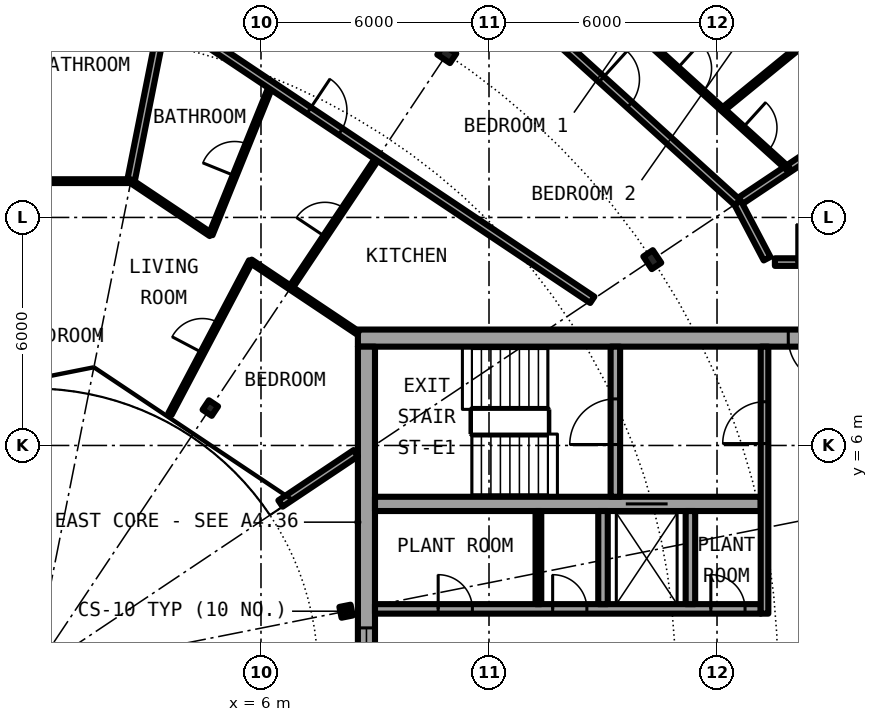
"""IFC4 building model, lengths in metres.
Left out: names, types, materials, properties, quantities, classifications, styles, units other than length and angle.
Written with IfcOpenShell. Run it as: python <this file> out.ifc"""

import sys

from ifc_helpers import new_model, si_unit, direction, frame, frame_2d, origin, origin_2d, place, context, subcontext, project, spatial, rectangle, i_section, extrude, element, fill, save


model = new_model("IFC4")
c1 = context("Model", 3, precision=1e-05, world=origin(), true_north=direction((0.0, 1.0)))
c2 = subcontext(c1, "Body", "Model", "MODEL_VIEW")
j1 = project(units=[si_unit("LENGTHUNIT", "METRE"), si_unit("PLANEANGLEUNIT", "RADIAN")], contexts=[c1])
p1 = place(None, origin())
s1 = spatial("IfcSite", under=j1, at=p1, CompositionType="ELEMENT")
p2 = place(p1, origin())
s2 = spatial("IfcBuilding", under=s1, at=p2, CompositionType="ELEMENT")
p3 = place(p2, frame((0.0, 0.0, 199.35)))
s3 = spatial("IfcBuildingStorey", under=s2, at=p3, CompositionType="ELEMENT", Elevation=199.35)
for number, where, z_axis, x_axis in (
    (1, (16.297, 10.889, 0.0), (0.0, 0.0, 1.0), (0.831, 0.556, 0.0)),
    (2, (10.889, 16.297, 0.0), (0.0, 0.0, 1.0), (0.556, 0.831, 0.0)),
):
    element("IfcColumn", number, at=place(p3, frame(where, z_axis=z_axis, x_axis=x_axis)), inside=s3, PredefinedType="COLUMN", context=c2, shape_type="SweptSolid", body=[
        extrude(i_section(OverallWidth=0.3, OverallDepth=0.4, WebThickness=0.013, FlangeThickness=0.024, FilletRadius=0.027, at=origin_2d()), origin(), (0.0, 0.0, 1.0), 3.05),
    ])
for number, where, z_axis, x_axis in (
    (3, (8.239, 1.639, 0.0), (0.0, 0.0, 1.0), (0.981, 0.195, 0.0)),
    (4, (4.667, 6.984, 0.0), (0.0, 0.0, 1.0), (0.556, 0.831, 0.0)),
):
    element("IfcColumn", number, at=place(p3, frame(where, z_axis=z_axis, x_axis=x_axis)), inside=s3, PredefinedType="COLUMN", context=c2, shape_type="SweptSolid", body=[
        extrude(i_section(OverallWidth=0.3, OverallDepth=0.29, WebThickness=0.009, FlangeThickness=0.014, FilletRadius=0.027, at=origin_2d()), origin(), (0.0, 0.0, 1.0), 3.05),
    ])
p4 = place(p3, frame((22.699, 15.167, 0.0), z_axis=(0.0, 0.0, 1.0), x_axis=(-0.634382322723, 0.773019449054, 0.0)))
e5 = element("IfcWall", 5, at=p4, inside=s3, PredefinedType="SOLIDWALL", context=c2, shape_type="SweptSolid", body=[
    extrude(rectangle(XDim=5.352, YDim=0.25, at=frame_2d((2.676, 0.0))), origin(), (0.0, 0.0, 1.0), 2.7),
])
p5 = place(p4, frame((0.441, 0.0, 0.3)))
e6 = element("IfcOpeningElement", 6, at=p5, cuts=e5, PredefinedType="OPENING", context=c2, shape_type="SweptSolid", body=[
    extrude(rectangle(XDim=1.8, YDim=2.1, at=frame_2d((0.9, 1.05))), frame((0.0, 0.135, 0.0), z_axis=(0.0, -1.0, 0.0), x_axis=(1.0, 0.0, 0.0)), (0.0, 0.0, 1.0), 0.27),
])
p6 = place(p4, frame((3.51, 0.0, 0.0)))
e7 = element("IfcOpeningElement", 7, at=p6, cuts=e5, PredefinedType="OPENING", context=c2, shape_type="SweptSolid", body=[
    extrude(rectangle(XDim=1.0, YDim=2.2, at=frame_2d((0.5, 1.1))), frame((0.0, 0.135, 0.0), z_axis=(0.0, -1.0, 0.0), x_axis=(1.0, 0.0, 0.0)), (0.0, 0.0, 1.0), 0.27),
])
p7 = place(p3, frame((22.05, 8.825, 0.0), z_axis=(0.0, 0.0, 1.0), x_axis=(-1.0, 0.0, 0.0)))
e8 = element("IfcWall", 8, at=p7, inside=s3, PredefinedType="SHEAR", context=c2, shape_type="SweptSolid", body=[
    extrude(rectangle(XDim=13.5, YDim=0.45, at=frame_2d((6.75, 0.0))), origin(), (0.0, 0.0, 1.0), 3.05),
])
p8 = place(p7, frame((0.975, 0.0, 0.0)))
e9 = element("IfcOpeningElement", 9, at=p8, cuts=e8, PredefinedType="OPENING", context=c2, shape_type="SweptSolid", body=[
    extrude(rectangle(XDim=1.2, YDim=2.3, at=frame_2d((0.6, 1.15))), frame((0.0, 0.235, 0.0), z_axis=(0.0, -1.0, 0.0), x_axis=(1.0, 0.0, 0.0)), (0.0, 0.0, 1.0), 0.47),
])
p9 = place(p3, frame((8.775, -8.6, 0.0), z_axis=(0.0, 0.0, 1.0), x_axis=(0.0, 1.0, 0.0)))
e10 = element("IfcWall", 10, at=p9, inside=s3, PredefinedType="SHEAR", context=c2, shape_type="SweptSolid", body=[
    extrude(rectangle(XDim=17.2, YDim=0.45, at=frame_2d((8.6, 0.0))), origin(), (0.0, 0.0, 1.0), 3.05),
])
p10 = place(p9, frame((7.4, 0.0, 0.1)))
e11 = element("IfcOpeningElement", 11, at=p10, cuts=e10, PredefinedType="OPENING", context=c2, shape_type="SweptSolid", body=[
    extrude(rectangle(XDim=2.4, YDim=2.2, at=frame_2d((1.2, 1.1))), frame((0.0, 0.235, 0.0), z_axis=(0.0, -1.0, 0.0), x_axis=(1.0, 0.0, 0.0)), (0.0, 0.0, 1.0), 0.47),
])
p11 = place(p3, frame((9.0, 1.7, 0.0), z_axis=(0.0, 0.0, 1.0), x_axis=(1.0, 0.0, 0.0)))
e12 = element("IfcWall", 12, at=p11, inside=s3, PredefinedType="SHEAR", context=c2, shape_type="SweptSolid", body=[
    extrude(rectangle(XDim=10.15, YDim=0.25, at=frame_2d((5.075, 0.0))), origin(), (0.0, 0.0, 1.0), 3.05),
])
p12 = place(p11, frame((1.663, 0.0, 0.0)))
e13 = element("IfcOpeningElement", 13, at=p12, cuts=e12, PredefinedType="OPENING", context=c2, shape_type="SweptSolid", body=[
    extrude(rectangle(XDim=0.9, YDim=2.3, at=frame_2d((0.45, 1.15))), frame((0.0, 0.135, 0.0), z_axis=(0.0, -1.0, 0.0), x_axis=(1.0, 0.0, 0.0)), (0.0, 0.0, 1.0), 0.27),
])
p13 = place(p11, frame((4.675, 0.0, 0.0)))
e14 = element("IfcOpeningElement", 14, at=p13, cuts=e12, PredefinedType="OPENING", context=c2, shape_type="SweptSolid", body=[
    extrude(rectangle(XDim=0.9, YDim=2.3, at=frame_2d((0.45, 1.15))), frame((0.0, 0.135, 0.0), z_axis=(0.0, -1.0, 0.0), x_axis=(1.0, 0.0, 0.0)), (0.0, 0.0, 1.0), 0.27),
])
p14 = place(p11, frame((8.837, 0.0, 0.0)))
e15 = element("IfcOpeningElement", 15, at=p14, cuts=e12, PredefinedType="OPENING", context=c2, shape_type="SweptSolid", body=[
    extrude(rectangle(XDim=0.9, YDim=2.3, at=frame_2d((0.45, 1.15))), frame((0.0, 0.135, 0.0), z_axis=(0.0, -1.0, 0.0), x_axis=(1.0, 0.0, 0.0)), (0.0, 0.0, 1.0), 0.27),
])
p15 = place(p3, frame((9.0, 4.462, 0.0), z_axis=(0.0, 0.0, 1.0), x_axis=(1.0, 0.0, 0.0)))
e16 = element("IfcWall", 16, at=p15, inside=s3, PredefinedType="SHEAR", context=c2, shape_type="SweptSolid", body=[
    extrude(rectangle(XDim=10.15, YDim=0.375, at=frame_2d((5.075, 0.0))), origin(), (0.0, 0.0, 1.0), 3.05),
])
p16 = place(p15, frame((6.6, 0.0, 0.0)))
e17 = element("IfcOpeningElement", 17, at=p16, cuts=e16, PredefinedType="OPENING", context=c2, shape_type="SweptSolid", body=[
    extrude(rectangle(XDim=1.1, YDim=2.3, at=frame_2d((0.55, 1.15))), frame((0.0, 0.198, 0.0), z_axis=(0.0, -1.0, 0.0), x_axis=(1.0, 0.0, 0.0)), (0.0, 0.0, 1.0), 0.395),
])
p17 = place(p3, frame((15.325, 4.65, 0.0), z_axis=(0.0, 0.0, 1.0), x_axis=(0.0, 1.0, 0.0)))
e18 = element("IfcWall", 18, at=p17, inside=s3, PredefinedType="SHEAR", context=c2, shape_type="SweptSolid", body=[
    extrude(rectangle(XDim=3.95, YDim=0.25, at=frame_2d((1.975, 0.0))), origin(), (0.0, 0.0, 1.0), 3.05),
])
p18 = place(p17, frame((1.375, 0.0, 0.0)))
e19 = element("IfcOpeningElement", 19, at=p18, cuts=e18, PredefinedType="OPENING", context=c2, shape_type="SweptSolid", body=[
    extrude(rectangle(XDim=1.2, YDim=2.3, at=frame_2d((0.6, 1.15))), frame((0.0, 0.135, 0.0), z_axis=(0.0, -1.0, 0.0), x_axis=(1.0, 0.0, 0.0)), (0.0, 0.0, 1.0), 0.27),
])
for number, where, z_axis, x_axis in (
    (20, (15.0, 1.825, 0.0), (0.0, 0.0, 1.0), (0.0, 1.0, 0.0)),
    (21, (17.3, 1.825, 0.0), (0.0, 0.0, 1.0), (0.0, 1.0, 0.0)),
):
    element("IfcWall", number, at=place(p3, frame(where, z_axis=z_axis, x_axis=x_axis)), inside=s3, PredefinedType="SOLIDWALL", context=c2, shape_type="SweptSolid", body=[
        extrude(rectangle(XDim=2.45, YDim=0.25, at=frame_2d((1.225, 0.0))), origin(), (0.0, 0.0, 1.0), 2.7),
    ])
p19 = place(p3, frame((19.25, 1.575, 0.0), z_axis=(0.0, 0.0, 1.0), x_axis=(0.0, 1.0, 0.0)))
e22 = element("IfcWall", 22, at=p19, inside=s3, PredefinedType="SOLIDWALL", context=c2, shape_type="SweptSolid", body=[
    extrude(rectangle(XDim=7.025, YDim=0.2, at=frame_2d((3.513, 0.0))), origin(), (0.0, 0.0, 1.0), 2.7),
])
p20 = place(p19, frame((4.475, 0.0, 0.0)))
e23 = element("IfcOpeningElement", 23, at=p20, cuts=e22, PredefinedType="OPENING", context=c2, shape_type="SweptSolid", body=[
    extrude(rectangle(XDim=1.1, YDim=2.3, at=frame_2d((0.55, 1.15))), frame((0.0, 0.11, 0.0), z_axis=(0.0, -1.0, 0.0), x_axis=(1.0, 0.0, 0.0)), (0.0, 0.0, 1.0), 0.22),
])
p21 = place(p3, frame((13.3, 1.825, 0.0), z_axis=(0.0, 0.0, 1.0), x_axis=(0.0, 1.0, 0.0)))
e24 = element("IfcWall", 24, at=p21, inside=s3, PredefinedType="PARTITIONING", context=c2, shape_type="SweptSolid", body=[
    extrude(rectangle(XDim=2.45, YDim=0.15, at=frame_2d((1.225, 0.0))), origin(), (0.0, 0.0, 1.0), 2.7),
])
p22 = place(p3, frame((2.577, 12.955, 0.0), z_axis=(0.0, 0.0, 1.0), x_axis=(0.195039294963, 0.980795428935, 0.0)))
e25 = element("IfcWall", 25, at=p22, inside=s3, PredefinedType="PARTITIONING", context=c2, shape_type="SweptSolid", body=[
    extrude(rectangle(XDim=4.491, YDim=0.2, at=frame_2d((2.246, 0.0))), origin(), (0.0, 0.0, 1.0), 2.7),
])
p23 = place(p3, frame((3.605, 6.827, 0.0), z_axis=(0.0, 0.0, 1.0), x_axis=(0.466962677975, 0.884277025246, 0.0)))
e26 = element("IfcWall", 26, at=p23, inside=s3, PredefinedType="PARTITIONING", context=c2, shape_type="SweptSolid", body=[
    extrude(rectangle(XDim=4.549, YDim=0.1, at=frame_2d((2.274, 0.0))), origin(), (0.0, 0.0, 1.0), 2.7),
])
p24 = place(p23, frame((1.824, 0.0, 0.0)))
e27 = element("IfcOpeningElement", 27, at=p24, cuts=e26, PredefinedType="OPENING", context=c2, shape_type="SweptSolid", body=[
    extrude(rectangle(XDim=0.9, YDim=2.3, at=frame_2d((0.45, 1.15))), frame((0.0, 0.06, 0.0), z_axis=(0.0, -1.0, 0.0), x_axis=(1.0, 0.0, 0.0)), (0.0, 0.0, 1.0), 0.12),
])
p25 = place(p3, frame((4.678, 11.551, 0.0), z_axis=(0.0, 0.0, 1.0), x_axis=(0.375509828455, 0.926818411952, 0.0)))
e28 = element("IfcWall", 28, at=p25, inside=s3, PredefinedType="PARTITIONING", context=c2, shape_type="SweptSolid", body=[
    extrude(rectangle(XDim=4.237, YDim=0.1, at=frame_2d((2.119, 0.0))), origin(), (0.0, 0.0, 1.0), 2.7),
])
p26 = place(p25, frame((1.669, 0.0, 0.0)))
e29 = element("IfcOpeningElement", 29, at=p26, cuts=e28, PredefinedType="OPENING", context=c2, shape_type="SweptSolid", body=[
    extrude(rectangle(XDim=0.9, YDim=2.3, at=frame_2d((0.45, 1.15))), frame((0.0, 0.06, 0.0), z_axis=(0.0, -1.0, 0.0), x_axis=(1.0, 0.0, 0.0)), (0.0, 0.0, 1.0), 0.12),
])
p27 = place(p3, frame((6.78, 10.147, 0.0), z_axis=(0.0, 0.0, 1.0), x_axis=(0.555528237031, 0.831497671591, 0.0)))
e30 = element("IfcWall", 30, at=p27, inside=s3, PredefinedType="PARTITIONING", context=c2, shape_type="SweptSolid", body=[
    extrude(rectangle(XDim=4.149, YDim=0.1, at=frame_2d((2.075, 0.0))), origin(), (0.0, 0.0, 1.0), 2.7),
])
p28 = place(p27, frame((1.625, 0.0, 0.0)))
e31 = element("IfcOpeningElement", 31, at=p28, cuts=e30, PredefinedType="OPENING", context=c2, shape_type="SweptSolid", body=[
    extrude(rectangle(XDim=0.9, YDim=2.3, at=frame_2d((0.45, 1.15))), frame((0.0, 0.06, 0.0), z_axis=(0.0, -1.0, 0.0), x_axis=(1.0, 0.0, 0.0)), (0.0, 0.0, 1.0), 0.12),
])
p29 = place(p3, frame((18.151, 14.838, 0.0), z_axis=(0.0, 0.0, 1.0), x_axis=(0.774321581607, 0.63279229472, 0.0)))
e32 = element("IfcWall", 32, at=p29, inside=s3, PredefinedType="PARTITIONING", context=c2, shape_type="SweptSolid", body=[
    extrude(rectangle(XDim=3.731, YDim=0.1, at=frame_2d((1.866, 0.0))), origin(), (0.0, 0.0, 1.0), 2.7),
])
p30 = place(p3, frame((18.542, 12.389, 0.0), z_axis=(0.0, 0.0, 1.0), x_axis=(0.831387096605, 0.55569370664, 0.0)))
e33 = element("IfcWall", 33, at=p30, inside=s3, PredefinedType="PARTITIONING", context=c2, shape_type="SweptSolid", body=[
    extrude(rectangle(XDim=4.875, YDim=0.2, at=frame_2d((2.438, 0.0))), origin(), (0.0, 0.0, 1.0), 2.7),
])
p31 = place(p3, frame((6.513, 4.472, 0.0), z_axis=(0.0, 0.0, 1.0), x_axis=(0.831403409976, 0.555669299026, 0.0)))
e34 = element("IfcWall", 34, at=p31, inside=s3, PredefinedType="PARTITIONING", context=c2, shape_type="SweptSolid", body=[
    extrude(rectangle(XDim=2.383, YDim=0.2, at=frame_2d((1.191, 0.0))), origin(), (0.0, 0.0, 1.0), 2.7),
])
p32 = place(p3, frame((19.523, 10.825, 0.0), z_axis=(0.0, 0.0, 1.0), x_axis=(1.0, 0.0, 0.0)))
e35 = element("IfcWall", 35, at=p32, inside=s3, PredefinedType="PARTITIONING", context=c2, shape_type="SweptSolid", body=[
    extrude(rectangle(XDim=2.152, YDim=0.2, at=frame_2d((1.076, 0.0))), origin(), (0.0, 0.0, 1.0), 2.7),
])
p33 = place(p32, frame((0.576, 0.0, 0.0)))
e36 = element("IfcOpeningElement", 36, at=p33, cuts=e35, PredefinedType="OPENING", context=c2, shape_type="SweptSolid", body=[
    extrude(rectangle(XDim=1.0, YDim=2.3, at=frame_2d((0.5, 1.15))), frame((0.0, 0.11, 0.0), z_axis=(0.0, -1.0, 0.0), x_axis=(1.0, 0.0, 0.0)), (0.0, 0.0, 1.0), 0.22),
])
p34 = place(p3, frame((2.577, 12.955, 0.0), z_axis=(0.0, 0.0, 1.0), x_axis=(0.831440395268, -0.555613956912, 0.0)))
e37 = element("IfcWall", 37, at=p34, inside=s3, PredefinedType="PARTITIONING", context=c2, shape_type="SweptSolid", body=[
    extrude(rectangle(XDim=2.527, YDim=0.1, at=frame_2d((1.264, 0.0))), origin(), (0.0, 0.0, 1.0), 2.7),
])
p35 = place(p3, frame((5.729, 10.849, 0.0), z_axis=(0.0, 0.0, 1.0), x_axis=(0.83129689803, -0.555828631257, 0.0)))
e38 = element("IfcWall", 38, at=p35, inside=s3, PredefinedType="PARTITIONING", context=c2, shape_type="SweptSolid", body=[
    extrude(rectangle(XDim=3.394, YDim=0.1, at=frame_2d((1.697, 0.0))), origin(), (0.0, 0.0, 1.0), 2.7),
])
p36 = place(p3, frame((3.453, 17.36, 0.0), z_axis=(0.0, 0.0, 1.0), x_axis=(0.831437137577, -0.555618831806, 0.0)))
e39 = element("IfcWall", 39, at=p36, inside=s3, PredefinedType="PARTITIONING", context=c2, shape_type="SweptSolid", body=[
    extrude(rectangle(XDim=13.549, YDim=0.2, at=frame_2d((6.774, 0.0))), origin(), (0.0, 0.0, 1.0), 2.7),
])
p37 = place(p36, frame((4.581, 0.0, 0.0)))
e40 = element("IfcOpeningElement", 40, at=p37, cuts=e39, PredefinedType="OPENING", context=c2, shape_type="SweptSolid", body=[
    extrude(rectangle(XDim=1.0, YDim=2.3, at=frame_2d((0.5, 1.15))), frame((0.0, 0.11, 0.0), z_axis=(0.0, -1.0, 0.0), x_axis=(1.0, 0.0, 0.0)), (0.0, 0.0, 1.0), 0.22),
])
p38 = place(p3, frame((10.512, 19.667, 0.0), z_axis=(0.0, 0.0, 1.0), x_axis=(0.740849323054, -0.67167125927, 0.0)))
e41 = element("IfcWall", 41, at=p38, inside=s3, PredefinedType="PARTITIONING", context=c2, shape_type="SweptSolid", body=[
    extrude(rectangle(XDim=10.842, YDim=0.2, at=frame_2d((5.421, 0.0))), origin(), (0.0, 0.0, 1.0), 2.7),
])
p39 = place(p38, frame((6.003, 0.0, 0.0)))
e42 = element("IfcOpeningElement", 42, at=p39, cuts=e41, PredefinedType="OPENING", context=c2, shape_type="SweptSolid", body=[
    extrude(rectangle(XDim=1.0, YDim=2.3, at=frame_2d((0.5, 1.15))), frame((0.0, 0.11, 0.0), z_axis=(0.0, -1.0, 0.0), x_axis=(1.0, 0.0, 0.0)), (0.0, 0.0, 1.0), 0.22),
])
p40 = place(p3, frame((18.542, 12.389, 0.0), z_axis=(0.0, 0.0, 1.0), x_axis=(0.465359652486, -0.885121683068, 0.0)))
e43 = element("IfcWall", 43, at=p40, inside=s3, PredefinedType="PARTITIONING", context=c2, shape_type="SweptSolid", body=[
    extrude(rectangle(XDim=1.665, YDim=0.2, at=frame_2d((0.833, 0.0))), origin(), (0.0, 0.0, 1.0), 2.7),
])
p41 = place(p3, frame((14.709, 17.958, 0.0), z_axis=(0.0, 0.0, 1.0), x_axis=(0.740923753351, -0.671589153962, 0.0)))
e44 = element("IfcWall", 44, at=p41, inside=s3, PredefinedType="PARTITIONING", context=c2, shape_type="SweptSolid", body=[
    extrude(rectangle(XDim=6.969, YDim=0.1, at=frame_2d((3.484, 0.0))), origin(), (0.0, 0.0, 1.0), 2.7),
])
p42 = place(p41, frame((3.034, 0.0, 0.0)))
e45 = element("IfcOpeningElement", 45, at=p42, cuts=e44, PredefinedType="OPENING", context=c2, shape_type="SweptSolid", body=[
    extrude(rectangle(XDim=0.9, YDim=2.3, at=frame_2d((0.45, 1.15))), frame((0.0, 0.06, 0.0), z_axis=(0.0, -1.0, 0.0), x_axis=(1.0, 0.0, 0.0)), (0.0, 0.0, 1.0), 0.12),
])
p43 = place(p41, frame((5.357, 0.0, 0.0)))
e46 = element("IfcOpeningElement", 46, at=p43, cuts=e44, PredefinedType="OPENING", context=c2, shape_type="SweptSolid", body=[
    extrude(rectangle(XDim=0.9, YDim=2.3, at=frame_2d((0.45, 1.15))), frame((0.0, 0.06, 0.0), z_axis=(0.0, -1.0, 0.0), x_axis=(1.0, 0.0, 0.0)), (0.0, 0.0, 1.0), 0.12),
])
p44 = place(p3, frame((2.557, 12.955, 0.0), z_axis=(0.0, 0.0, 1.0), x_axis=(-1.0, 0.0, 0.0)))
e47 = element("IfcWall", 47, at=p44, inside=s3, PredefinedType="PARTITIONING", context=c2, shape_type="SweptSolid", body=[
    extrude(rectangle(XDim=2.537, YDim=0.1, at=frame_2d((1.269, 0.0))), origin(), (0.0, 0.0, 1.0), 2.7),
])
p45 = place(p16, origin())
e48 = element("IfcDoor", 48, at=p45, inside=s3, OperationType="DOUBLE_DOOR_SLIDING", PredefinedType="DOOR", context=c2, shape_type="SweptSolid", body=[
    extrude(rectangle(XDim=1.1, YDim=2.3, at=frame_2d((0.55, 1.15))), frame((0.0, 0.025, 0.0), z_axis=(0.0, -1.0, 0.0), x_axis=(1.0, 0.0, 0.0)), (0.0, 0.0, 1.0), 0.05),
])
fill(e17, e48)
p46 = place(p12, origin())
e49 = element("IfcDoor", 49, at=p46, inside=s3, OperationType="SINGLE_SWING_RIGHT", PredefinedType="DOOR", context=c2, shape_type="SweptSolid", body=[
    extrude(rectangle(XDim=0.9, YDim=2.3, at=frame_2d((0.45, 1.15))), frame((0.0, 0.025, 0.0), z_axis=(0.0, -1.0, 0.0), x_axis=(1.0, 0.0, 0.0)), (0.0, 0.0, 1.0), 0.05),
])
fill(e13, e49)
p47 = place(p13, origin())
e50 = element("IfcDoor", 50, at=p47, inside=s3, OperationType="SINGLE_SWING_LEFT", PredefinedType="DOOR", context=c2, shape_type="SweptSolid", body=[
    extrude(rectangle(XDim=0.9, YDim=2.3, at=frame_2d((0.45, 1.15))), frame((0.0, 0.025, 0.0), z_axis=(0.0, -1.0, 0.0), x_axis=(1.0, 0.0, 0.0)), (0.0, 0.0, 1.0), 0.05),
])
fill(e14, e50)
p48 = place(p14, origin())
e51 = element("IfcDoor", 51, at=p48, inside=s3, OperationType="SINGLE_SWING_LEFT", PredefinedType="DOOR", context=c2, shape_type="SweptSolid", body=[
    extrude(rectangle(XDim=0.9, YDim=2.3, at=frame_2d((0.45, 1.15))), frame((0.0, 0.025, 0.0), z_axis=(0.0, -1.0, 0.0), x_axis=(1.0, 0.0, 0.0)), (0.0, 0.0, 1.0), 0.05),
])
fill(e15, e51)
p49 = place(p18, origin())
e52 = element("IfcDoor", 52, at=p49, inside=s3, OperationType="SINGLE_SWING_LEFT", PredefinedType="DOOR", context=c2, shape_type="SweptSolid", body=[
    extrude(rectangle(XDim=1.2, YDim=2.3, at=frame_2d((0.6, 1.15))), frame((0.0, 0.025, 0.0), z_axis=(0.0, -1.0, 0.0), x_axis=(1.0, 0.0, 0.0)), (0.0, 0.0, 1.0), 0.05),
])
fill(e19, e52)
p50 = place(p20, origin())
e53 = element("IfcDoor", 53, at=p50, inside=s3, OperationType="SINGLE_SWING_LEFT", PredefinedType="DOOR", context=c2, shape_type="SweptSolid", body=[
    extrude(rectangle(XDim=1.1, YDim=2.3, at=frame_2d((0.55, 1.15))), frame((0.0, 0.025, 0.0), z_axis=(0.0, -1.0, 0.0), x_axis=(1.0, 0.0, 0.0)), (0.0, 0.0, 1.0), 0.05),
])
fill(e23, e53)
p51 = place(p8, origin())
e54 = element("IfcDoor", 54, at=p51, inside=s3, OperationType="SINGLE_SWING_RIGHT", PredefinedType="DOOR", context=c2, shape_type="SweptSolid", body=[
    extrude(rectangle(XDim=1.2, YDim=2.3, at=frame_2d((0.6, 1.15))), frame((0.0, 0.025, 0.0), z_axis=(0.0, -1.0, 0.0), x_axis=(1.0, 0.0, 0.0)), (0.0, 0.0, 1.0), 0.05),
])
fill(e9, e54)
p52 = place(p10, origin())
e55 = element("IfcWindow", 55, at=p52, inside=s3, PartitioningType="SINGLE_PANEL", PredefinedType="WINDOW", context=c2, shape_type="SweptSolid", body=[
    extrude(rectangle(XDim=2.4, YDim=2.2, at=frame_2d((1.2, 1.1))), frame((0.0, 0.03, 0.0), z_axis=(0.0, -1.0, 0.0), x_axis=(1.0, 0.0, 0.0)), (0.0, 0.0, 1.0), 0.06),
])
fill(e11, e55)
p53 = place(p39, origin())
e56 = element("IfcDoor", 56, at=p53, inside=s3, OperationType="SINGLE_SWING_RIGHT", PredefinedType="DOOR", context=c2, shape_type="SweptSolid", body=[
    extrude(rectangle(XDim=1.0, YDim=2.3, at=frame_2d((0.5, 1.15))), frame((0.0, 0.025, 0.0), z_axis=(0.0, -1.0, 0.0), x_axis=(1.0, 0.0, 0.0)), (0.0, 0.0, 1.0), 0.05),
])
fill(e42, e56)
p54 = place(p42, origin())
e57 = element("IfcDoor", 57, at=p54, inside=s3, OperationType="SINGLE_SWING_LEFT", PredefinedType="DOOR", context=c2, shape_type="SweptSolid", body=[
    extrude(rectangle(XDim=0.9, YDim=2.3, at=frame_2d((0.45, 1.15))), frame((0.0, 0.025, 0.0), z_axis=(0.0, -1.0, 0.0), x_axis=(1.0, 0.0, 0.0)), (0.0, 0.0, 1.0), 0.05),
])
fill(e45, e57)
p55 = place(p43, origin())
e58 = element("IfcDoor", 58, at=p55, inside=s3, OperationType="SINGLE_SWING_RIGHT", PredefinedType="DOOR", context=c2, shape_type="SweptSolid", body=[
    extrude(rectangle(XDim=0.9, YDim=2.3, at=frame_2d((0.45, 1.15))), frame((0.0, 0.025, 0.0), z_axis=(0.0, -1.0, 0.0), x_axis=(1.0, 0.0, 0.0)), (0.0, 0.0, 1.0), 0.05),
])
fill(e46, e58)
p56 = place(p37, origin())
e59 = element("IfcDoor", 59, at=p56, inside=s3, OperationType="SINGLE_SWING_LEFT", PredefinedType="DOOR", context=c2, shape_type="SweptSolid", body=[
    extrude(rectangle(XDim=1.0, YDim=2.3, at=frame_2d((0.5, 1.15))), frame((0.0, 0.025, 0.0), z_axis=(0.0, -1.0, 0.0), x_axis=(1.0, 0.0, 0.0)), (0.0, 0.0, 1.0), 0.05),
])
fill(e40, e59)
p57 = place(p26, origin())
e60 = element("IfcDoor", 60, at=p57, inside=s3, OperationType="SINGLE_SWING_RIGHT", PredefinedType="DOOR", context=c2, shape_type="SweptSolid", body=[
    extrude(rectangle(XDim=0.9, YDim=2.3, at=frame_2d((0.45, 1.15))), frame((0.0, 0.025, 0.0), z_axis=(0.0, -1.0, 0.0), x_axis=(1.0, 0.0, 0.0)), (0.0, 0.0, 1.0), 0.05),
])
fill(e29, e60)
p58 = place(p28, origin())
e61 = element("IfcDoor", 61, at=p58, inside=s3, OperationType="SINGLE_SWING_RIGHT", PredefinedType="DOOR", context=c2, shape_type="SweptSolid", body=[
    extrude(rectangle(XDim=0.9, YDim=2.3, at=frame_2d((0.45, 1.15))), frame((0.0, 0.025, 0.0), z_axis=(0.0, -1.0, 0.0), x_axis=(1.0, 0.0, 0.0)), (0.0, 0.0, 1.0), 0.05),
])
fill(e31, e61)
p59 = place(p24, origin())
e62 = element("IfcDoor", 62, at=p59, inside=s3, OperationType="SINGLE_SWING_LEFT", PredefinedType="DOOR", context=c2, shape_type="SweptSolid", body=[
    extrude(rectangle(XDim=0.9, YDim=2.3, at=frame_2d((0.45, 1.15))), frame((0.0, 0.025, 0.0), z_axis=(0.0, -1.0, 0.0), x_axis=(1.0, 0.0, 0.0)), (0.0, 0.0, 1.0), 0.05),
])
fill(e27, e62)
p60 = place(p33, origin())
e63 = element("IfcDoor", 63, at=p60, inside=s3, OperationType="SINGLE_SWING_LEFT", PredefinedType="DOOR", context=c2, shape_type="SweptSolid", body=[
    extrude(rectangle(XDim=1.0, YDim=2.3, at=frame_2d((0.5, 1.15))), frame((0.0, 0.025, 0.0), z_axis=(0.0, -1.0, 0.0), x_axis=(1.0, 0.0, 0.0)), (0.0, 0.0, 1.0), 0.05),
])
fill(e36, e63)
save(model, sys.argv[1])
